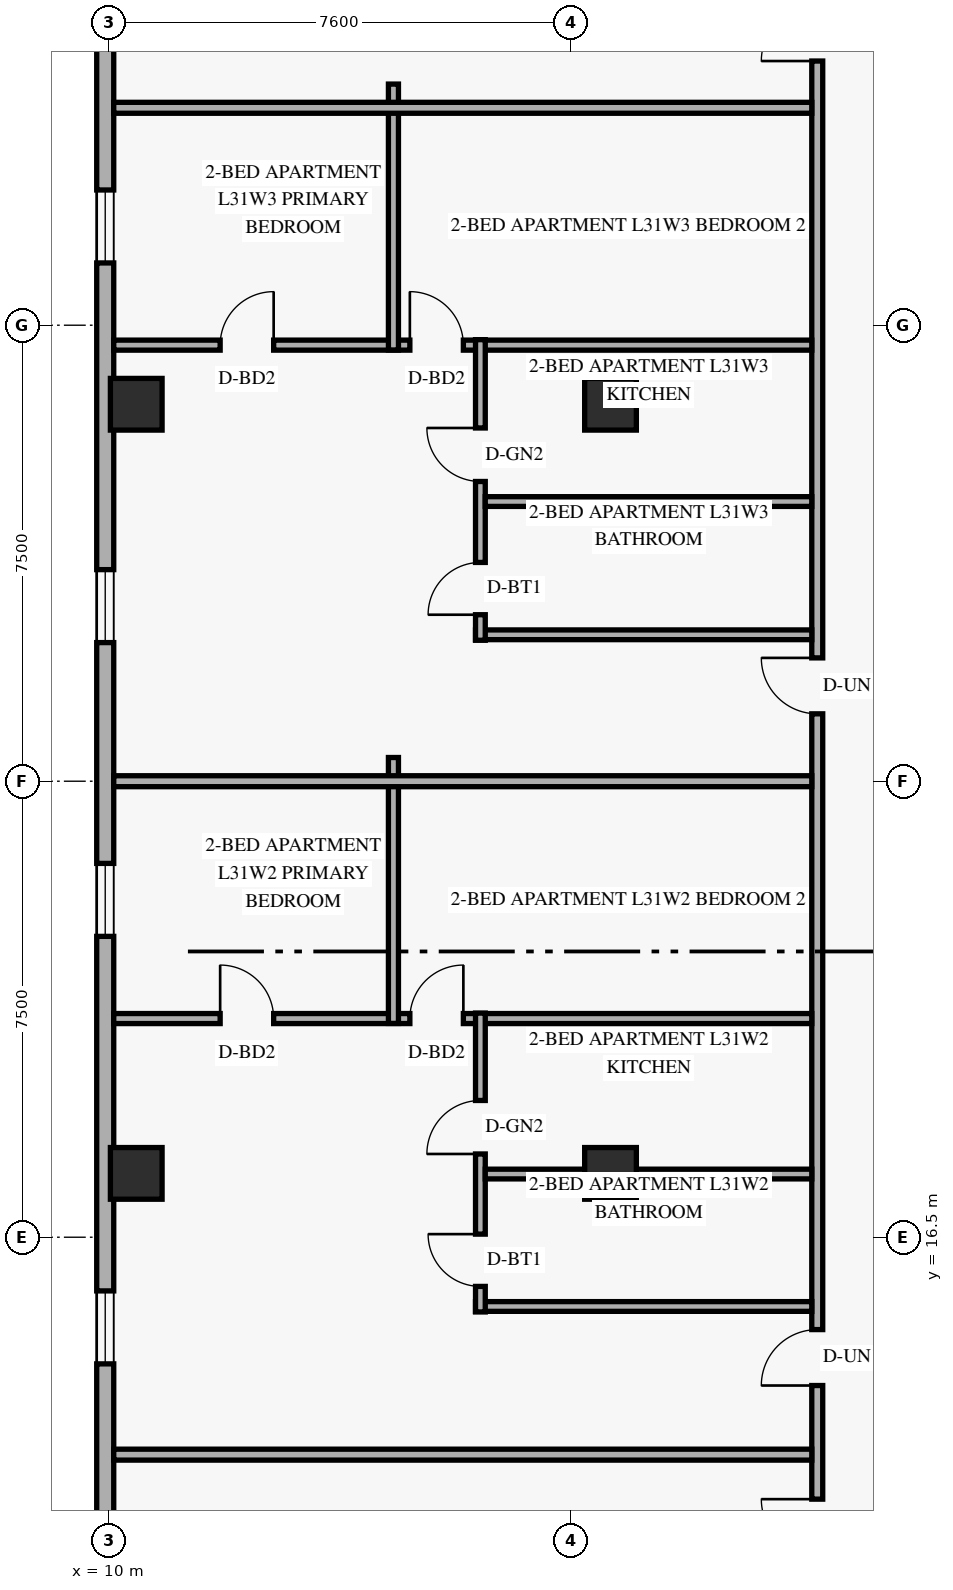
"""IFC4 building model, lengths in metres.
Left out: names, types, materials, properties, quantities, classifications, styles, units other than length and angle.
Written with IfcOpenShell. Run it as: python <this file> out.ifc"""

import sys

from ifc_helpers import new_model, si_unit, direction, frame, frame_2d, origin, origin_2d, place, context, subcontext, project, spatial, rectangle, extrude, element, fill, save


model = new_model("IFC4")
c1 = context("Model", 3, precision=1e-05, world=origin(), true_north=direction((0.0, 1.0)))
c2 = subcontext(c1, "Body", "Model", "MODEL_VIEW")
j1 = project(units=[si_unit("LENGTHUNIT", "METRE"), si_unit("PLANEANGLEUNIT", "RADIAN")], contexts=[c1])
p1 = place(None, origin())
s1 = spatial("IfcSite", under=j1, at=p1, CompositionType="ELEMENT")
p2 = place(p1, origin())
s2 = spatial("IfcBuilding", under=s1, at=p2, CompositionType="ELEMENT")
p3 = place(p2, frame((0.0, 0.0, 121.2)))
s3 = spatial("IfcBuildingStorey", under=s2, at=p3, CompositionType="ELEMENT", Elevation=121.2)
for number, where, z_axis, x_axis in (
    (1, (10.45, 17.55, 0.0), (0.0, 0.0, 1.0), (1.0, 0.0, 0.0)),
    (2, (10.45, 30.2, 0.0), (0.0, 0.0, 1.0), (1.0, 0.0, 0.0)),
    (3, (18.25, 17.55, 0.0), (0.0, 0.0, 1.0), (1.0, 0.0, 0.0)),
    (4, (18.25, 30.2, 0.0), (0.0, 0.0, 1.0), (1.0, 0.0, 0.0)),
):
    element("IfcColumn", number, at=place(p3, frame(where, z_axis=z_axis, x_axis=x_axis)), inside=s3, PredefinedType="COLUMN", context=c2, shape_type="SweptSolid", body=[
        extrude(rectangle(XDim=0.85, YDim=0.85, at=origin_2d()), origin(), (0.0, 0.0, 1.0), 3.6),
    ])
p4 = place(p3, frame((9.94, 41.68, 0.0), z_axis=(0.0, 0.0, 1.0), x_axis=(0.0, -1.0, 0.0)))
e5 = element("IfcWall", 5, at=p4, inside=s3, PredefinedType="SOLIDWALL", context=c2, shape_type="SweptSolid", body=[
    extrude(rectangle(XDim=35.36, YDim=0.28, at=frame_2d((17.68, 0.0))), origin(), (0.0, 0.0, 1.0), 3.36),
])
p5 = place(p4, frame((29.773, 0.0, 0.85)))
e6 = element("IfcOpeningElement", 6, at=p5, cuts=e5, PredefinedType="OPENING", context=c2, shape_type="SweptSolid", body=[
    extrude(rectangle(XDim=1.2, YDim=1.5, at=frame_2d((0.6, 0.75))), frame((0.0, 0.15, 0.0), z_axis=(0.0, -1.0, 0.0), x_axis=(1.0, 0.0, 0.0)), (0.0, 0.0, 1.0), 0.3),
])
p6 = place(p4, frame((26.063, 0.0, 0.85)))
e7 = element("IfcOpeningElement", 7, at=p6, cuts=e5, PredefinedType="OPENING", context=c2, shape_type="SweptSolid", body=[
    extrude(rectangle(XDim=1.2, YDim=1.5, at=frame_2d((0.6, 0.75))), frame((0.0, 0.15, 0.0), z_axis=(0.0, -1.0, 0.0), x_axis=(1.0, 0.0, 0.0)), (0.0, 0.0, 1.0), 0.3),
])
p7 = place(p4, frame((19.032, 0.0, 0.85)))
e8 = element("IfcOpeningElement", 8, at=p7, cuts=e5, PredefinedType="OPENING", context=c2, shape_type="SweptSolid", body=[
    extrude(rectangle(XDim=1.2, YDim=1.5, at=frame_2d((0.6, 0.75))), frame((0.0, 0.15, 0.0), z_axis=(0.0, -1.0, 0.0), x_axis=(1.0, 0.0, 0.0)), (0.0, 0.0, 1.0), 0.3),
])
p8 = place(p4, frame((14.2, 0.0, 0.85)))
e9 = element("IfcOpeningElement", 9, at=p8, cuts=e5, PredefinedType="OPENING", context=c2, shape_type="SweptSolid", body=[
    extrude(rectangle(XDim=1.2, YDim=1.5, at=frame_2d((0.6, 0.75))), frame((0.0, 0.15, 0.0), z_axis=(0.0, -1.0, 0.0), x_axis=(1.0, 0.0, 0.0)), (0.0, 0.0, 1.0), 0.3),
])
p9 = place(p4, frame((7.956, 0.0, 0.85)))
e10 = element("IfcOpeningElement", 10, at=p9, cuts=e5, PredefinedType="OPENING", context=c2, shape_type="SweptSolid", body=[
    extrude(rectangle(XDim=1.2, YDim=1.5, at=frame_2d((0.6, 0.75))), frame((0.0, 0.15, 0.0), z_axis=(0.0, -1.0, 0.0), x_axis=(1.0, 0.0, 0.0)), (0.0, 0.0, 1.0), 0.3),
])
p10 = place(p4, frame((4.387, 0.0, 0.85)))
e11 = element("IfcOpeningElement", 11, at=p10, cuts=e5, PredefinedType="OPENING", context=c2, shape_type="SweptSolid", body=[
    extrude(rectangle(XDim=1.2, YDim=1.5, at=frame_2d((0.6, 0.75))), frame((0.0, 0.15, 0.0), z_axis=(0.0, -1.0, 0.0), x_axis=(1.0, 0.0, 0.0)), (0.0, 0.0, 1.0), 0.3),
])
p11 = place(p3, frame((21.65, 6.8, 0.0), z_axis=(0.0, 0.0, 1.0), x_axis=(0.0, 1.0, 0.0)))
e12 = element("IfcWall", 12, at=p11, inside=s3, PredefinedType="STANDARD", context=c2, shape_type="SweptSolid", body=[
    extrude(rectangle(XDim=34.4, YDim=0.18, at=frame_2d((17.2, 0.0))), origin(), (0.0, 0.0, 1.0), 2.731),
])
p12 = place(p11, frame((4.472, 0.0, 0.0)))
e13 = element("IfcOpeningElement", 13, at=p12, cuts=e12, PredefinedType="OPENING", context=c2, shape_type="SweptSolid", body=[
    extrude(rectangle(XDim=0.92, YDim=2.15, at=frame_2d((0.46, 1.075))), frame((0.0, 0.1, 0.0), z_axis=(0.0, -1.0, 0.0), x_axis=(1.0, 0.0, 0.0)), (0.0, 0.0, 1.0), 0.2),
])
p13 = place(p11, frame((7.261, 0.0, 0.0)))
e14 = element("IfcOpeningElement", 14, at=p13, cuts=e12, PredefinedType="OPENING", context=c2, shape_type="SweptSolid", body=[
    extrude(rectangle(XDim=0.92, YDim=2.15, at=frame_2d((0.46, 1.075))), frame((0.0, 0.1, 0.0), z_axis=(0.0, -1.0, 0.0), x_axis=(1.0, 0.0, 0.0)), (0.0, 0.0, 1.0), 0.2),
])
p14 = place(p11, frame((18.308, 0.0, 0.0)))
e15 = element("IfcOpeningElement", 15, at=p14, cuts=e12, PredefinedType="OPENING", context=c2, shape_type="SweptSolid", body=[
    extrude(rectangle(XDim=0.92, YDim=2.15, at=frame_2d((0.46, 1.075))), frame((0.0, 0.1, 0.0), z_axis=(0.0, -1.0, 0.0), x_axis=(1.0, 0.0, 0.0)), (0.0, 0.0, 1.0), 0.2),
])
p15 = place(p11, frame((29.045, 0.0, 0.0)))
e16 = element("IfcOpeningElement", 16, at=p15, cuts=e12, PredefinedType="OPENING", context=c2, shape_type="SweptSolid", body=[
    extrude(rectangle(XDim=0.92, YDim=2.15, at=frame_2d((0.46, 1.075))), frame((0.0, 0.1, 0.0), z_axis=(0.0, -1.0, 0.0), x_axis=(1.0, 0.0, 0.0)), (0.0, 0.0, 1.0), 0.2),
])
p16 = place(p3, frame((10.08, 12.924, 0.0), z_axis=(0.0, 0.0, 1.0), x_axis=(1.0, 0.0, 0.0)))
e17 = element("IfcWall", 17, at=p16, inside=s3, PredefinedType="PARTITIONING", context=c2, shape_type="SweptSolid", body=[
    extrude(rectangle(XDim=11.48, YDim=0.18, at=frame_2d((5.74, 0.0))), origin(), (0.0, 0.0, 1.0), 2.731),
])
p17 = place(p3, frame((10.08, 20.096, 0.0), z_axis=(0.0, 0.0, 1.0), x_axis=(1.0, 0.0, 0.0)))
e18 = element("IfcWall", 18, at=p17, inside=s3, PredefinedType="PARTITIONING", context=c2, shape_type="SweptSolid", body=[
    extrude(rectangle(XDim=11.48, YDim=0.165, at=frame_2d((5.74, 0.0))), origin(), (0.0, 0.0, 1.0), 2.731),
])
p18 = place(p17, frame((1.75, 0.0, 0.0)))
e19 = element("IfcOpeningElement", 19, at=p18, cuts=e18, PredefinedType="OPENING", context=c2, shape_type="SweptSolid", body=[
    extrude(rectangle(XDim=0.88, YDim=2.14, at=frame_2d((0.44, 1.07))), frame((0.0, 0.093, 0.0), z_axis=(0.0, -1.0, 0.0), x_axis=(1.0, 0.0, 0.0)), (0.0, 0.0, 1.0), 0.185),
])
p19 = place(p17, frame((4.87, 0.0, 0.0)))
e20 = element("IfcOpeningElement", 20, at=p19, cuts=e18, PredefinedType="OPENING", context=c2, shape_type="SweptSolid", body=[
    extrude(rectangle(XDim=0.88, YDim=2.14, at=frame_2d((0.44, 1.07))), frame((0.0, 0.093, 0.0), z_axis=(0.0, -1.0, 0.0), x_axis=(1.0, 0.0, 0.0)), (0.0, 0.0, 1.0), 0.185),
])
p20 = place(p3, frame((16.03, 15.361, 0.0), z_axis=(0.0, 0.0, 1.0), x_axis=(1.0, 0.0, 0.0)))
e21 = element("IfcWall", 21, at=p20, inside=s3, PredefinedType="PLUMBINGWALL", context=c2, shape_type="SweptSolid", body=[
    extrude(rectangle(XDim=5.53, YDim=0.16, at=frame_2d((2.765, 0.0))), origin(), (0.0, 0.0, 1.0), 2.731),
])
p21 = place(p3, frame((16.11, 15.271, 0.0), z_axis=(0.0, 0.0, 1.0), x_axis=(0.0, 1.0, 0.0)))
e22 = element("IfcWall", 22, at=p21, inside=s3, PredefinedType="PLUMBINGWALL", context=c2, shape_type="SweptSolid", body=[
    extrude(rectangle(XDim=4.915, YDim=0.16, at=frame_2d((2.458, 0.0))), origin(), (0.0, 0.0, 1.0), 2.731),
])
p22 = place(p21, frame((0.42, 0.0, 0.0)))
e23 = element("IfcOpeningElement", 23, at=p22, cuts=e22, PredefinedType="OPENING", context=c2, shape_type="SweptSolid", body=[
    extrude(rectangle(XDim=0.86, YDim=2.12, at=frame_2d((0.43, 1.06))), frame((0.0, 0.09, 0.0), z_axis=(0.0, -1.0, 0.0), x_axis=(1.0, 0.0, 0.0)), (0.0, 0.0, 1.0), 0.18),
])
p23 = place(p21, frame((2.598, 0.0, 0.0)))
e24 = element("IfcOpeningElement", 24, at=p23, cuts=e22, PredefinedType="OPENING", context=c2, shape_type="SweptSolid", body=[
    extrude(rectangle(XDim=0.88, YDim=2.12, at=frame_2d((0.44, 1.06))), frame((0.0, 0.09, 0.0), z_axis=(0.0, -1.0, 0.0), x_axis=(1.0, 0.0, 0.0)), (0.0, 0.0, 1.0), 0.18),
])
p24 = place(p3, frame((16.19, 17.539, 0.0), z_axis=(0.0, 0.0, 1.0), x_axis=(1.0, 0.0, 0.0)))
e25 = element("IfcWall", 25, at=p24, inside=s3, PredefinedType="PLUMBINGWALL", context=c2, shape_type="SweptSolid", body=[
    extrude(rectangle(XDim=5.37, YDim=0.16, at=frame_2d((2.685, 0.0))), origin(), (0.0, 0.0, 1.0), 2.731),
])
p25 = place(p3, frame((14.68, 20.016, 0.0), z_axis=(0.0, 0.0, 1.0), x_axis=(0.0, 1.0, 0.0)))
e26 = element("IfcWall", 26, at=p25, inside=s3, PredefinedType="PARTITIONING", context=c2, shape_type="SweptSolid", body=[
    extrude(rectangle(XDim=4.374, YDim=0.165, at=frame_2d((2.187, 0.0))), origin(), (0.0, 0.0, 1.0), 3.36),
])
p26 = place(p3, frame((10.08, 24.0, 0.0), z_axis=(0.0, 0.0, 1.0), x_axis=(1.0, 0.0, 0.0)))
e27 = element("IfcWall", 27, at=p26, inside=s3, PredefinedType="PARTITIONING", context=c2, shape_type="SweptSolid", body=[
    extrude(rectangle(XDim=11.48, YDim=0.18, at=frame_2d((5.74, 0.0))), origin(), (0.0, 0.0, 1.0), 2.731),
])
p27 = place(p3, frame((10.08, 31.172, 0.0), z_axis=(0.0, 0.0, 1.0), x_axis=(1.0, 0.0, 0.0)))
e28 = element("IfcWall", 28, at=p27, inside=s3, PredefinedType="PARTITIONING", context=c2, shape_type="SweptSolid", body=[
    extrude(rectangle(XDim=11.48, YDim=0.165, at=frame_2d((5.74, 0.0))), origin(), (0.0, 0.0, 1.0), 2.731),
])
p28 = place(p27, frame((1.75, 0.0, 0.0)))
e29 = element("IfcOpeningElement", 29, at=p28, cuts=e28, PredefinedType="OPENING", context=c2, shape_type="SweptSolid", body=[
    extrude(rectangle(XDim=0.88, YDim=2.14, at=frame_2d((0.44, 1.07))), frame((0.0, 0.093, 0.0), z_axis=(0.0, -1.0, 0.0), x_axis=(1.0, 0.0, 0.0)), (0.0, 0.0, 1.0), 0.185),
])
p29 = place(p27, frame((4.87, 0.0, 0.0)))
e30 = element("IfcOpeningElement", 30, at=p29, cuts=e28, PredefinedType="OPENING", context=c2, shape_type="SweptSolid", body=[
    extrude(rectangle(XDim=0.88, YDim=2.14, at=frame_2d((0.44, 1.07))), frame((0.0, 0.093, 0.0), z_axis=(0.0, -1.0, 0.0), x_axis=(1.0, 0.0, 0.0)), (0.0, 0.0, 1.0), 0.185),
])
p30 = place(p3, frame((16.03, 26.408, 0.0), z_axis=(0.0, 0.0, 1.0), x_axis=(1.0, 0.0, 0.0)))
e31 = element("IfcWall", 31, at=p30, inside=s3, PredefinedType="PLUMBINGWALL", context=c2, shape_type="SweptSolid", body=[
    extrude(rectangle(XDim=5.53, YDim=0.16, at=frame_2d((2.765, 0.0))), origin(), (0.0, 0.0, 1.0), 2.731),
])
p31 = place(p3, frame((16.11, 26.318, 0.0), z_axis=(0.0, 0.0, 1.0), x_axis=(0.0, 1.0, 0.0)))
e32 = element("IfcWall", 32, at=p31, inside=s3, PredefinedType="PLUMBINGWALL", context=c2, shape_type="SweptSolid", body=[
    extrude(rectangle(XDim=4.944, YDim=0.16, at=frame_2d((2.472, 0.0))), origin(), (0.0, 0.0, 1.0), 2.731),
])
p32 = place(p31, frame((0.42, 0.0, 0.0)))
e33 = element("IfcOpeningElement", 33, at=p32, cuts=e32, PredefinedType="OPENING", context=c2, shape_type="SweptSolid", body=[
    extrude(rectangle(XDim=0.86, YDim=2.12, at=frame_2d((0.43, 1.06))), frame((0.0, 0.09, 0.0), z_axis=(0.0, -1.0, 0.0), x_axis=(1.0, 0.0, 0.0)), (0.0, 0.0, 1.0), 0.18),
])
p33 = place(p31, frame((2.611, 0.0, 0.0)))
e34 = element("IfcOpeningElement", 34, at=p33, cuts=e32, PredefinedType="OPENING", context=c2, shape_type="SweptSolid", body=[
    extrude(rectangle(XDim=0.88, YDim=2.12, at=frame_2d((0.44, 1.06))), frame((0.0, 0.09, 0.0), z_axis=(0.0, -1.0, 0.0), x_axis=(1.0, 0.0, 0.0)), (0.0, 0.0, 1.0), 0.18),
])
p34 = place(p3, frame((16.19, 28.6, 0.0), z_axis=(0.0, 0.0, 1.0), x_axis=(1.0, 0.0, 0.0)))
e35 = element("IfcWall", 35, at=p34, inside=s3, PredefinedType="PLUMBINGWALL", context=c2, shape_type="SweptSolid", body=[
    extrude(rectangle(XDim=5.37, YDim=0.16, at=frame_2d((2.685, 0.0))), origin(), (0.0, 0.0, 1.0), 2.731),
])
p35 = place(p3, frame((14.68, 31.092, 0.0), z_axis=(0.0, 0.0, 1.0), x_axis=(0.0, 1.0, 0.0)))
e36 = element("IfcWall", 36, at=p35, inside=s3, PredefinedType="PARTITIONING", context=c2, shape_type="SweptSolid", body=[
    extrude(rectangle(XDim=4.374, YDim=0.165, at=frame_2d((2.187, 0.0))), origin(), (0.0, 0.0, 1.0), 2.988),
])
p36 = place(p3, frame((10.08, 35.076, 0.0), z_axis=(0.0, 0.0, 1.0), x_axis=(1.0, 0.0, 0.0)))
e37 = element("IfcWall", 37, at=p36, inside=s3, PredefinedType="PARTITIONING", context=c2, shape_type="SweptSolid", body=[
    extrude(rectangle(XDim=11.48, YDim=0.18, at=frame_2d((5.74, 0.0))), origin(), (0.0, 0.0, 1.0), 2.731),
])
p37 = place(p6, origin())
e38 = element("IfcWindow", 38, at=p37, inside=s3, PartitioningType="SINGLE_PANEL", PredefinedType="WINDOW", context=c2, shape_type="SweptSolid", body=[
    extrude(rectangle(XDim=1.2, YDim=1.5, at=frame_2d((0.6, 0.75))), frame((0.0, 0.03, 0.0), z_axis=(0.0, -1.0, 0.0), x_axis=(1.0, 0.0, 0.0)), (0.0, 0.0, 1.0), 0.06),
])
fill(e7, e38)
p38 = place(p7, origin())
e39 = element("IfcWindow", 39, at=p38, inside=s3, PartitioningType="SINGLE_PANEL", PredefinedType="WINDOW", context=c2, shape_type="SweptSolid", body=[
    extrude(rectangle(XDim=1.2, YDim=1.5, at=frame_2d((0.6, 0.75))), frame((0.0, 0.03, 0.0), z_axis=(0.0, -1.0, 0.0), x_axis=(1.0, 0.0, 0.0)), (0.0, 0.0, 1.0), 0.06),
])
fill(e8, e39)
p39 = place(p8, origin())
e40 = element("IfcWindow", 40, at=p39, inside=s3, PartitioningType="SINGLE_PANEL", PredefinedType="WINDOW", context=c2, shape_type="SweptSolid", body=[
    extrude(rectangle(XDim=1.2, YDim=1.5, at=frame_2d((0.6, 0.75))), frame((0.0, 0.03, 0.0), z_axis=(0.0, -1.0, 0.0), x_axis=(1.0, 0.0, 0.0)), (0.0, 0.0, 1.0), 0.06),
])
fill(e9, e40)
p40 = place(p9, origin())
e41 = element("IfcWindow", 41, at=p40, inside=s3, PartitioningType="SINGLE_PANEL", PredefinedType="WINDOW", context=c2, shape_type="SweptSolid", body=[
    extrude(rectangle(XDim=1.2, YDim=1.5, at=frame_2d((0.6, 0.75))), frame((0.0, 0.03, 0.0), z_axis=(0.0, -1.0, 0.0), x_axis=(1.0, 0.0, 0.0)), (0.0, 0.0, 1.0), 0.06),
])
fill(e10, e41)
p41 = place(p12, origin())
e42 = element("IfcDoor", 42, at=p41, inside=s3, OperationType="SINGLE_SWING_RIGHT", PredefinedType="DOOR", context=c2, shape_type="SweptSolid", body=[
    extrude(rectangle(XDim=0.92, YDim=2.15, at=frame_2d((0.46, 1.075))), frame((0.0, 0.025, 0.0), z_axis=(0.0, -1.0, 0.0), x_axis=(1.0, 0.0, 0.0)), (0.0, 0.0, 1.0), 0.05),
])
fill(e13, e42)
p42 = place(p13, origin())
e43 = element("IfcDoor", 43, at=p42, inside=s3, OperationType="SINGLE_SWING_LEFT", PredefinedType="DOOR", context=c2, shape_type="SweptSolid", body=[
    extrude(rectangle(XDim=0.92, YDim=2.15, at=frame_2d((0.46, 1.075))), frame((0.0, 0.025, 0.0), z_axis=(0.0, -1.0, 0.0), x_axis=(1.0, 0.0, 0.0)), (0.0, 0.0, 1.0), 0.05),
])
fill(e14, e43)
p43 = place(p22, origin())
e44 = element("IfcDoor", 44, at=p43, inside=s3, OperationType="SINGLE_SWING_RIGHT", PredefinedType="DOOR", context=c2, shape_type="SweptSolid", body=[
    extrude(rectangle(XDim=0.86, YDim=2.12, at=frame_2d((0.43, 1.06))), frame((0.0, 0.025, 0.0), z_axis=(0.0, -1.0, 0.0), x_axis=(1.0, 0.0, 0.0)), (0.0, 0.0, 1.0), 0.05),
])
fill(e23, e44)
p44 = place(p23, origin())
e45 = element("IfcDoor", 45, at=p44, inside=s3, OperationType="SINGLE_SWING_LEFT", PredefinedType="DOOR", context=c2, shape_type="SweptSolid", body=[
    extrude(rectangle(XDim=0.88, YDim=2.12, at=frame_2d((0.44, 1.06))), frame((0.0, 0.025, 0.0), z_axis=(0.0, -1.0, 0.0), x_axis=(1.0, 0.0, 0.0)), (0.0, 0.0, 1.0), 0.05),
])
fill(e24, e45)
p45 = place(p18, origin())
e46 = element("IfcDoor", 46, at=p45, inside=s3, OperationType="SINGLE_SWING_LEFT", PredefinedType="DOOR", context=c2, shape_type="SweptSolid", body=[
    extrude(rectangle(XDim=0.88, YDim=2.14, at=frame_2d((0.44, 1.07))), frame((0.0, 0.025, 0.0), z_axis=(0.0, -1.0, 0.0), x_axis=(1.0, 0.0, 0.0)), (0.0, 0.0, 1.0), 0.05),
])
fill(e19, e46)
p46 = place(p19, origin())
e47 = element("IfcDoor", 47, at=p46, inside=s3, OperationType="SINGLE_SWING_RIGHT", PredefinedType="DOOR", context=c2, shape_type="SweptSolid", body=[
    extrude(rectangle(XDim=0.88, YDim=2.14, at=frame_2d((0.44, 1.07))), frame((0.0, 0.025, 0.0), z_axis=(0.0, -1.0, 0.0), x_axis=(1.0, 0.0, 0.0)), (0.0, 0.0, 1.0), 0.05),
])
fill(e20, e47)
p47 = place(p14, origin())
e48 = element("IfcDoor", 48, at=p47, inside=s3, OperationType="SINGLE_SWING_RIGHT", PredefinedType="DOOR", context=c2, shape_type="SweptSolid", body=[
    extrude(rectangle(XDim=0.92, YDim=2.15, at=frame_2d((0.46, 1.075))), frame((0.0, 0.025, 0.0), z_axis=(0.0, -1.0, 0.0), x_axis=(1.0, 0.0, 0.0)), (0.0, 0.0, 1.0), 0.05),
])
fill(e15, e48)
p48 = place(p32, origin())
e49 = element("IfcDoor", 49, at=p48, inside=s3, OperationType="SINGLE_SWING_LEFT", PredefinedType="DOOR", context=c2, shape_type="SweptSolid", body=[
    extrude(rectangle(XDim=0.86, YDim=2.12, at=frame_2d((0.43, 1.06))), frame((0.0, 0.025, 0.0), z_axis=(0.0, -1.0, 0.0), x_axis=(1.0, 0.0, 0.0)), (0.0, 0.0, 1.0), 0.05),
])
fill(e33, e49)
p49 = place(p33, origin())
e50 = element("IfcDoor", 50, at=p49, inside=s3, OperationType="SINGLE_SWING_RIGHT", PredefinedType="DOOR", context=c2, shape_type="SweptSolid", body=[
    extrude(rectangle(XDim=0.88, YDim=2.12, at=frame_2d((0.44, 1.06))), frame((0.0, 0.025, 0.0), z_axis=(0.0, -1.0, 0.0), x_axis=(1.0, 0.0, 0.0)), (0.0, 0.0, 1.0), 0.05),
])
fill(e34, e50)
p50 = place(p28, origin())
e51 = element("IfcDoor", 51, at=p50, inside=s3, OperationType="SINGLE_SWING_RIGHT", PredefinedType="DOOR", context=c2, shape_type="SweptSolid", body=[
    extrude(rectangle(XDim=0.88, YDim=2.14, at=frame_2d((0.44, 1.07))), frame((0.0, 0.025, 0.0), z_axis=(0.0, -1.0, 0.0), x_axis=(1.0, 0.0, 0.0)), (0.0, 0.0, 1.0), 0.05),
])
fill(e29, e51)
p51 = place(p29, origin())
e52 = element("IfcDoor", 52, at=p51, inside=s3, OperationType="SINGLE_SWING_LEFT", PredefinedType="DOOR", context=c2, shape_type="SweptSolid", body=[
    extrude(rectangle(XDim=0.88, YDim=2.14, at=frame_2d((0.44, 1.07))), frame((0.0, 0.025, 0.0), z_axis=(0.0, -1.0, 0.0), x_axis=(1.0, 0.0, 0.0)), (0.0, 0.0, 1.0), 0.05),
])
fill(e30, e52)
p52 = place(p15, origin())
e53 = element("IfcDoor", 53, at=p52, inside=s3, OperationType="SINGLE_SWING_LEFT", PredefinedType="DOOR", context=c2, shape_type="SweptSolid", body=[
    extrude(rectangle(XDim=0.92, YDim=2.15, at=frame_2d((0.46, 1.075))), frame((0.0, 0.025, 0.0), z_axis=(0.0, -1.0, 0.0), x_axis=(1.0, 0.0, 0.0)), (0.0, 0.0, 1.0), 0.05),
])
fill(e16, e53)
save(model, sys.argv[1])
